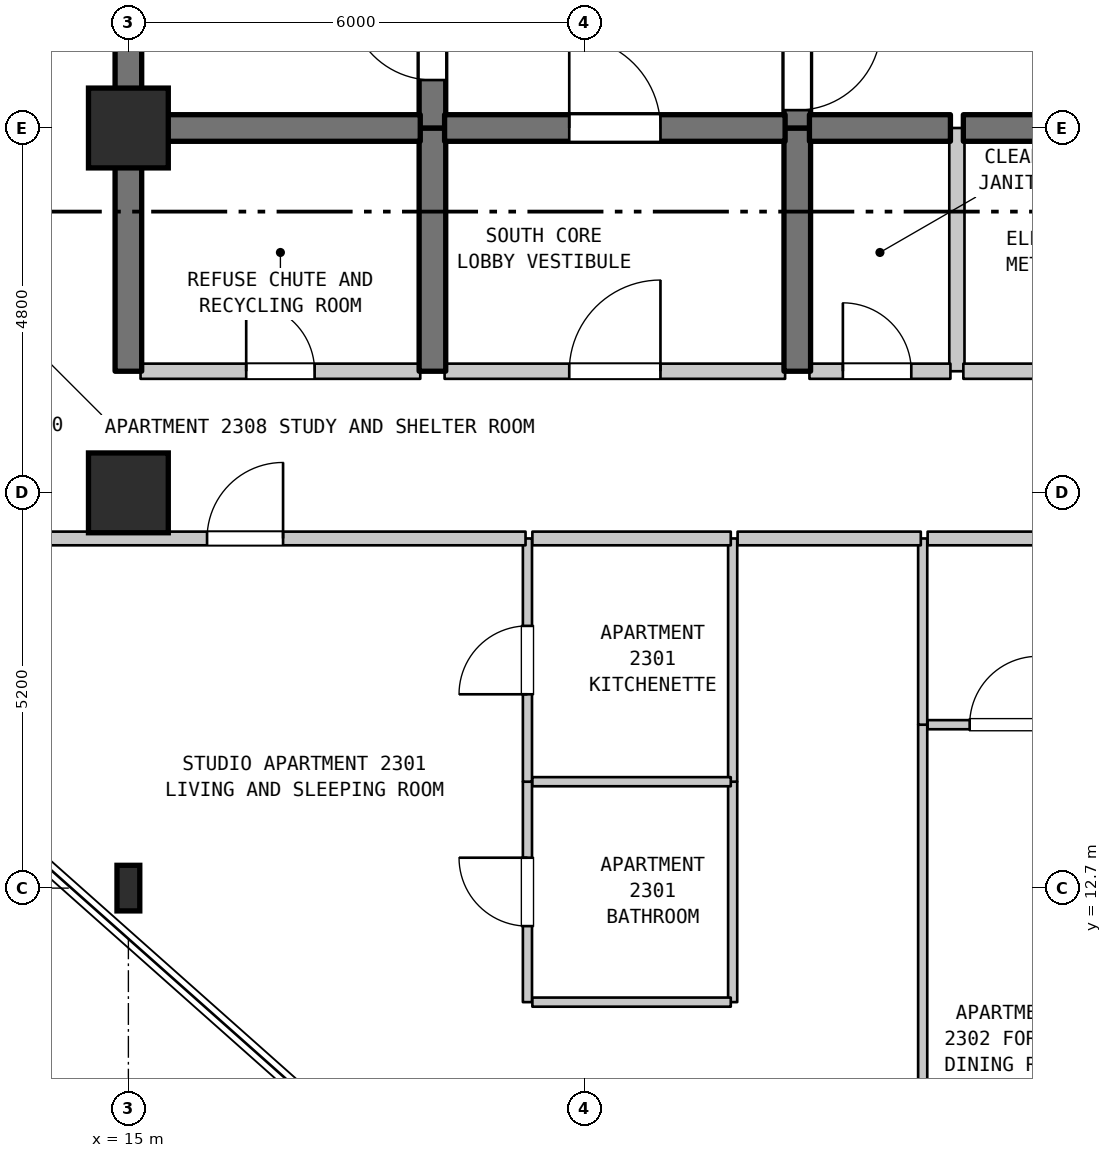
"""IFC4 building model, lengths in metres.
Left out: names, types, materials, properties, quantities, classifications, styles, units other than length and angle.
Written with IfcOpenShell. Run it as: python <this file> out.ifc"""

import sys

from ifc_helpers import new_model, si_unit, direction, frame, frame_2d, origin, origin_2d, place, context, subcontext, project, spatial, rectangle, i_section, extrude, element, fill, save


model = new_model("IFC4")
c1 = context("Model", 3, precision=1e-05, world=origin(), true_north=direction((0.0, 1.0)))
c2 = subcontext(c1, "Body", "Model", "MODEL_VIEW")
j1 = project(units=[si_unit("LENGTHUNIT", "METRE"), si_unit("PLANEANGLEUNIT", "RADIAN")], contexts=[c1])
p1 = place(None, origin())
s1 = spatial("IfcSite", under=j1, at=p1, CompositionType="ELEMENT")
p2 = place(p1, origin())
s2 = spatial("IfcBuilding", under=s1, at=p2, CompositionType="ELEMENT")
p3 = place(p2, frame((0.0, 0.0, 98.3)))
s3 = spatial("IfcBuildingStorey", under=s2, at=p3, CompositionType="ELEMENT", Elevation=98.3)
p4 = place(p3, frame((15.0, 12.7, 0.0), z_axis=(0.0, 0.0, 1.0), x_axis=(1.0, 0.0, 0.0)))
e1 = element("IfcColumn", 1, at=p4, inside=s3, PredefinedType="COLUMN", context=c2, shape_type="SweptSolid", body=[
    extrude(i_section(OverallWidth=0.3, OverallDepth=0.6, WebThickness=0.015, FlangeThickness=0.03, FilletRadius=0.027, at=origin_2d()), origin(), (0.0, 0.0, 1.0), 3.7),
])
for number, where, z_axis, x_axis in (
    (2, (15.0, 17.9, 0.0), (0.0, 0.0, 1.0), (1.0, 0.0, 0.0)),
    (3, (15.0, 22.7, 0.0), (0.0, 0.0, 1.0), (1.0, 0.0, 0.0)),
):
    element("IfcColumn", number, at=place(p3, frame(where, z_axis=z_axis, x_axis=x_axis)), inside=s3, PredefinedType="COLUMN", context=c2, shape_type="SweptSolid", body=[
        extrude(rectangle(XDim=1.05, YDim=1.05, at=origin_2d()), origin(), (0.0, 0.0, 1.0), 3.7),
    ])
p5 = place(p3, frame((15.0, 19.5, 0.0), z_axis=(0.0, 0.0, 1.0), x_axis=(0.0, 1.0, 0.0)))
e4 = element("IfcWall", 4, at=p5, inside=s3, PredefinedType="SHEAR", context=c2, shape_type="SweptSolid", body=[
    extrude(rectangle(XDim=3.2, YDim=0.35, at=frame_2d((1.6, 0.0))), origin(), (0.0, 0.0, 1.0), 3.385),
])
p6 = place(p3, frame((15.0, 22.7, 0.0), z_axis=(0.0, 0.0, 1.0), x_axis=(0.0, 1.0, 0.0)))
e5 = element("IfcWall", 5, at=p6, inside=s3, PredefinedType="SHEAR", context=c2, shape_type="SweptSolid", body=[
    extrude(rectangle(XDim=6.8, YDim=0.35, at=frame_2d((3.4, 0.0))), origin(), (0.0, 0.0, 1.0), 3.385),
])
p7 = place(p3, frame((19.0, 19.5, 0.0), z_axis=(0.0, 0.0, 1.0), x_axis=(0.0, 1.0, 0.0)))
e6 = element("IfcWall", 6, at=p7, inside=s3, PredefinedType="SHEAR", context=c2, shape_type="SweptSolid", body=[
    extrude(rectangle(XDim=3.2, YDim=0.35, at=frame_2d((1.6, 0.0))), origin(), (0.0, 0.0, 1.0), 3.385),
])
p8 = place(p3, frame((19.0, 22.7, 0.0), z_axis=(0.0, 0.0, 1.0), x_axis=(0.0, 1.0, 0.0)))
e7 = element("IfcWall", 7, at=p8, inside=s3, PredefinedType="SHEAR", context=c2, shape_type="SweptSolid", body=[
    extrude(rectangle(XDim=5.5, YDim=0.35, at=frame_2d((2.75, 0.0))), origin(), (0.0, 0.0, 1.0), 3.385),
])
p9 = place(p8, frame((0.631, 0.0, 0.0)))
e8 = element("IfcOpeningElement", 8, at=p9, cuts=e7, PredefinedType="OPENING", context=c2, shape_type="SweptSolid", body=[
    extrude(rectangle(XDim=1.1, YDim=2.15, at=frame_2d((0.55, 1.075))), frame((0.0, 0.185, 0.0), z_axis=(0.0, -1.0, 0.0), x_axis=(1.0, 0.0, 0.0)), (0.0, 0.0, 1.0), 0.37),
])
p10 = place(p3, frame((20.25, 11.2, 0.0), z_axis=(0.0, 0.0, 1.0), x_axis=(0.0, 1.0, 0.0)))
e9 = element("IfcWall", 9, at=p10, inside=s3, PredefinedType="PARTITIONING", context=c2, shape_type="SweptSolid", body=[
    extrude(rectangle(XDim=2.9, YDim=0.12, at=frame_2d((1.45, 0.0))), origin(), (0.0, 0.0, 1.0), 3.385),
])
p11 = place(p10, frame((1.0, 0.0, 0.0)))
e10 = element("IfcOpeningElement", 10, at=p11, cuts=e9, PredefinedType="OPENING", context=c2, shape_type="SweptSolid", body=[
    extrude(rectangle(XDim=0.9, YDim=2.1, at=frame_2d((0.45, 1.05))), frame((0.0, 0.07, 0.0), z_axis=(0.0, -1.0, 0.0), x_axis=(1.0, 0.0, 0.0)), (0.0, 0.0, 1.0), 0.14),
])
p12 = place(p3, frame((20.25, 14.1, 0.0), z_axis=(0.0, 0.0, 1.0), x_axis=(0.0, 1.0, 0.0)))
e11 = element("IfcWall", 11, at=p12, inside=s3, PredefinedType="PARTITIONING", context=c2, shape_type="SweptSolid", body=[
    extrude(rectangle(XDim=3.2, YDim=0.12, at=frame_2d((1.6, 0.0))), origin(), (0.0, 0.0, 1.0), 3.385),
])
p13 = place(p12, frame((1.15, 0.0, 0.0)))
e12 = element("IfcOpeningElement", 12, at=p13, cuts=e11, PredefinedType="OPENING", context=c2, shape_type="SweptSolid", body=[
    extrude(rectangle(XDim=0.9, YDim=2.15, at=frame_2d((0.45, 1.075))), frame((0.0, 0.07, 0.0), z_axis=(0.0, -1.0, 0.0), x_axis=(1.0, 0.0, 0.0)), (0.0, 0.0, 1.0), 0.14),
])
p14 = place(p3, frame((22.95, 11.2, 0.0), z_axis=(0.0, 0.0, 1.0), x_axis=(0.0, 1.0, 0.0)))
e13 = element("IfcWall", 13, at=p14, inside=s3, PredefinedType="PARTITIONING", context=c2, shape_type="SweptSolid", body=[
    extrude(rectangle(XDim=2.9, YDim=0.12, at=frame_2d((1.45, 0.0))), origin(), (0.0, 0.0, 1.0), 3.385),
])
p15 = place(p3, frame((22.95, 14.1, 0.0), z_axis=(0.0, 0.0, 1.0), x_axis=(0.0, 1.0, 0.0)))
e14 = element("IfcWall", 14, at=p15, inside=s3, PredefinedType="PARTITIONING", context=c2, shape_type="SweptSolid", body=[
    extrude(rectangle(XDim=3.2, YDim=0.12, at=frame_2d((1.6, 0.0))), origin(), (0.0, 0.0, 1.0), 3.385),
])
p16 = place(p3, frame((23.8, 19.5, 0.0), z_axis=(0.0, 0.0, 1.0), x_axis=(0.0, 1.0, 0.0)))
e15 = element("IfcWall", 15, at=p16, inside=s3, PredefinedType="SHEAR", context=c2, shape_type="SweptSolid", body=[
    extrude(rectangle(XDim=3.2, YDim=0.35, at=frame_2d((1.6, 0.0))), origin(), (0.0, 0.0, 1.0), 3.385),
])
p17 = place(p3, frame((23.8, 22.7, 0.0), z_axis=(0.0, 0.0, 1.0), x_axis=(0.0, 1.0, 0.0)))
e16 = element("IfcWall", 16, at=p17, inside=s3, PredefinedType="SHEAR", context=c2, shape_type="SweptSolid", body=[
    extrude(rectangle(XDim=5.5, YDim=0.35, at=frame_2d((2.75, 0.0))), origin(), (0.0, 0.0, 1.0), 3.385),
])
p18 = place(p17, frame((0.235, 0.0, 0.0)))
e17 = element("IfcOpeningElement", 17, at=p18, cuts=e16, PredefinedType="OPENING", context=c2, shape_type="SweptSolid", body=[
    extrude(rectangle(XDim=1.1, YDim=2.15, at=frame_2d((0.55, 1.075))), frame((0.0, 0.185, 0.0), z_axis=(0.0, -1.0, 0.0), x_axis=(1.0, 0.0, 0.0)), (0.0, 0.0, 1.0), 0.37),
])
p19 = place(p3, frame((25.45, 0.71, 0.0), z_axis=(0.0, 0.0, 1.0), x_axis=(0.0, 1.0, 0.0)))
e18 = element("IfcWall", 18, at=p19, inside=s3, PredefinedType="PARTITIONING", context=c2, shape_type="SweptSolid", body=[
    extrude(rectangle(XDim=14.14, YDim=0.12, at=frame_2d((7.07, 0.0))), origin(), (0.0, 0.0, 1.0), 3.385),
])
p20 = place(p3, frame((25.45, 14.85, 0.0), z_axis=(0.0, 0.0, 1.0), x_axis=(0.0, 1.0, 0.0)))
e19 = element("IfcWall", 19, at=p20, inside=s3, PredefinedType="PARTITIONING", context=c2, shape_type="SweptSolid", body=[
    extrude(rectangle(XDim=2.45, YDim=0.12, at=frame_2d((1.225, 0.0))), origin(), (0.0, 0.0, 1.0), 3.385),
])
p21 = place(p3, frame((25.9, 19.5, 0.0), z_axis=(0.0, 0.0, 1.0), x_axis=(0.0, 1.0, 0.0)))
e20 = element("IfcWall", 20, at=p21, inside=s3, PredefinedType="STANDARD", context=c2, shape_type="SweptSolid", body=[
    extrude(rectangle(XDim=3.2, YDim=0.2, at=frame_2d((1.6, 0.0))), origin(), (0.0, 0.0, 1.0), 3.385),
])
for number, where, z_axis, x_axis in (
    (21, (20.315, 11.2, 0.0), (0.0, 0.0, 1.0), (1.0, 0.0, 0.0)),
    (22, (20.315, 14.1, 0.0), (0.0, 0.0, 1.0), (1.0, 0.0, 0.0)),
):
    element("IfcWall", number, at=place(p3, frame(where, z_axis=z_axis, x_axis=x_axis)), inside=s3, PredefinedType="PARTITIONING", context=c2, shape_type="SweptSolid", body=[
        extrude(rectangle(XDim=2.61, YDim=0.12, at=frame_2d((1.305, 0.0))), origin(), (0.0, 0.0, 1.0), 3.385),
    ])
p22 = place(p3, frame((25.515, 14.85, 0.0), z_axis=(0.0, 0.0, 1.0), x_axis=(1.0, 0.0, 0.0)))
e23 = element("IfcWall", 23, at=p22, inside=s3, PredefinedType="PARTITIONING", context=c2, shape_type="SweptSolid", body=[
    extrude(rectangle(XDim=2.16, YDim=0.12, at=frame_2d((1.08, 0.0))), origin(), (0.0, 0.0, 1.0), 3.385),
])
p23 = place(p22, frame((0.553, 0.0, 0.0)))
e24 = element("IfcOpeningElement", 24, at=p23, cuts=e23, PredefinedType="OPENING", context=c2, shape_type="SweptSolid", body=[
    extrude(rectangle(XDim=0.9, YDim=2.15, at=frame_2d((0.45, 1.075))), frame((0.0, 0.07, 0.0), z_axis=(0.0, -1.0, 0.0), x_axis=(1.0, 0.0, 0.0)), (0.0, 0.0, 1.0), 0.14),
])
p24 = place(p3, frame((12.875, 17.3, 0.0), z_axis=(0.0, 0.0, 1.0), x_axis=(1.0, 0.0, 0.0)))
e25 = element("IfcWall", 25, at=p24, inside=s3, PredefinedType="STANDARD", context=c2, shape_type="SweptSolid", body=[
    extrude(rectangle(XDim=7.35, YDim=0.18, at=frame_2d((3.675, 0.0))), origin(), (0.0, 0.0, 1.0), 3.385),
])
p25 = place(p24, frame((3.16, 0.0, 0.0)))
e26 = element("IfcOpeningElement", 26, at=p25, cuts=e25, PredefinedType="OPENING", context=c2, shape_type="SweptSolid", body=[
    extrude(rectangle(XDim=1.0, YDim=2.15, at=frame_2d((0.5, 1.075))), frame((0.0, 0.1, 0.0), z_axis=(0.0, -1.0, 0.0), x_axis=(1.0, 0.0, 0.0)), (0.0, 0.0, 1.0), 0.2),
])
p26 = place(p3, frame((20.315, 17.3, 0.0), z_axis=(0.0, 0.0, 1.0), x_axis=(1.0, 0.0, 0.0)))
e27 = element("IfcWall", 27, at=p26, inside=s3, PredefinedType="STANDARD", context=c2, shape_type="SweptSolid", body=[
    extrude(rectangle(XDim=2.61, YDim=0.18, at=frame_2d((1.305, 0.0))), origin(), (0.0, 0.0, 1.0), 3.385),
])
p27 = place(p3, frame((23.015, 17.3, 0.0), z_axis=(0.0, 0.0, 1.0), x_axis=(1.0, 0.0, 0.0)))
e28 = element("IfcWall", 28, at=p27, inside=s3, PredefinedType="STANDARD", context=c2, shape_type="SweptSolid", body=[
    extrude(rectangle(XDim=2.41, YDim=0.18, at=frame_2d((1.205, 0.0))), origin(), (0.0, 0.0, 1.0), 3.385),
])
p28 = place(p3, frame((25.515, 17.3, 0.0), z_axis=(0.0, 0.0, 1.0), x_axis=(1.0, 0.0, 0.0)))
e29 = element("IfcWall", 29, at=p28, inside=s3, PredefinedType="STANDARD", context=c2, shape_type="SweptSolid", body=[
    extrude(rectangle(XDim=5.095, YDim=0.18, at=frame_2d((2.548, 0.0))), origin(), (0.0, 0.0, 1.0), 3.385),
])
p29 = place(p28, frame((2.08, 0.0, 0.0)))
e30 = element("IfcOpeningElement", 30, at=p29, cuts=e29, PredefinedType="OPENING", context=c2, shape_type="SweptSolid", body=[
    extrude(rectangle(XDim=1.0, YDim=2.15, at=frame_2d((0.5, 1.075))), frame((0.0, 0.1, 0.0), z_axis=(0.0, -1.0, 0.0), x_axis=(1.0, 0.0, 0.0)), (0.0, 0.0, 1.0), 0.2),
])
p30 = place(p3, frame((15.16, 19.5, 0.0), z_axis=(0.0, 0.0, 1.0), x_axis=(1.0, 0.0, 0.0)))
e31 = element("IfcWall", 31, at=p30, inside=s3, PredefinedType="STANDARD", context=c2, shape_type="SweptSolid", body=[
    extrude(rectangle(XDim=3.68, YDim=0.2, at=frame_2d((1.84, 0.0))), origin(), (0.0, 0.0, 1.0), 3.385),
])
p31 = place(p30, frame((1.39, 0.0, 0.0)))
e32 = element("IfcOpeningElement", 32, at=p31, cuts=e31, PredefinedType="OPENING", context=c2, shape_type="SweptSolid", body=[
    extrude(rectangle(XDim=0.9, YDim=2.15, at=frame_2d((0.45, 1.075))), frame((0.0, 0.11, 0.0), z_axis=(0.0, -1.0, 0.0), x_axis=(1.0, 0.0, 0.0)), (0.0, 0.0, 1.0), 0.22),
])
p32 = place(p3, frame((19.16, 19.5, 0.0), z_axis=(0.0, 0.0, 1.0), x_axis=(1.0, 0.0, 0.0)))
e33 = element("IfcWall", 33, at=p32, inside=s3, PredefinedType="STANDARD", context=c2, shape_type="SweptSolid", body=[
    extrude(rectangle(XDim=4.48, YDim=0.2, at=frame_2d((2.24, 0.0))), origin(), (0.0, 0.0, 1.0), 3.385),
])
p33 = place(p32, frame((1.64, 0.0, 0.0)))
e34 = element("IfcOpeningElement", 34, at=p33, cuts=e33, PredefinedType="OPENING", context=c2, shape_type="SweptSolid", body=[
    extrude(rectangle(XDim=1.2, YDim=2.2, at=frame_2d((0.6, 1.1))), frame((0.0, 0.11, 0.0), z_axis=(0.0, -1.0, 0.0), x_axis=(1.0, 0.0, 0.0)), (0.0, 0.0, 1.0), 0.22),
])
p34 = place(p3, frame((23.96, 19.5, 0.0), z_axis=(0.0, 0.0, 1.0), x_axis=(1.0, 0.0, 0.0)))
e35 = element("IfcWall", 35, at=p34, inside=s3, PredefinedType="STANDARD", context=c2, shape_type="SweptSolid", body=[
    extrude(rectangle(XDim=1.855, YDim=0.2, at=frame_2d((0.927, 0.0))), origin(), (0.0, 0.0, 1.0), 3.385),
])
p35 = place(p34, frame((0.44, 0.0, 0.0)))
e36 = element("IfcOpeningElement", 36, at=p35, cuts=e35, PredefinedType="OPENING", context=c2, shape_type="SweptSolid", body=[
    extrude(rectangle(XDim=0.9, YDim=2.15, at=frame_2d((0.45, 1.075))), frame((0.0, 0.11, 0.0), z_axis=(0.0, -1.0, 0.0), x_axis=(1.0, 0.0, 0.0)), (0.0, 0.0, 1.0), 0.22),
])
p36 = place(p3, frame((25.985, 19.5, 0.0), z_axis=(0.0, 0.0, 1.0), x_axis=(1.0, 0.0, 0.0)))
e37 = element("IfcWall", 37, at=p36, inside=s3, PredefinedType="STANDARD", context=c2, shape_type="SweptSolid", body=[
    extrude(rectangle(XDim=4.655, YDim=0.2, at=frame_2d((2.327, 0.0))), origin(), (0.0, 0.0, 1.0), 3.385),
])
p37 = place(p36, frame((1.845, 0.0, 0.0)))
e38 = element("IfcOpeningElement", 38, at=p37, cuts=e37, PredefinedType="OPENING", context=c2, shape_type="SweptSolid", body=[
    extrude(rectangle(XDim=0.9, YDim=2.15, at=frame_2d((0.45, 1.075))), frame((0.0, 0.11, 0.0), z_axis=(0.0, -1.0, 0.0), x_axis=(1.0, 0.0, 0.0)), (0.0, 0.0, 1.0), 0.22),
])
p38 = place(p3, frame((15.16, 22.7, 0.0), z_axis=(0.0, 0.0, 1.0), x_axis=(1.0, 0.0, 0.0)))
e39 = element("IfcWall", 39, at=p38, inside=s3, PredefinedType="SHEAR", context=c2, shape_type="SweptSolid", body=[
    extrude(rectangle(XDim=3.68, YDim=0.35, at=frame_2d((1.84, 0.0))), origin(), (0.0, 0.0, 1.0), 3.385),
])
p39 = place(p3, frame((19.16, 22.7, 0.0), z_axis=(0.0, 0.0, 1.0), x_axis=(1.0, 0.0, 0.0)))
e40 = element("IfcWall", 40, at=p39, inside=s3, PredefinedType="SHEAR", context=c2, shape_type="SweptSolid", body=[
    extrude(rectangle(XDim=4.48, YDim=0.35, at=frame_2d((2.24, 0.0))), origin(), (0.0, 0.0, 1.0), 3.385),
])
p40 = place(p39, frame((1.64, 0.0, 0.0)))
e41 = element("IfcOpeningElement", 41, at=p40, cuts=e40, PredefinedType="OPENING", context=c2, shape_type="SweptSolid", body=[
    extrude(rectangle(XDim=1.2, YDim=2.2, at=frame_2d((0.6, 1.1))), frame((0.0, 0.185, 0.0), z_axis=(0.0, -1.0, 0.0), x_axis=(1.0, 0.0, 0.0)), (0.0, 0.0, 1.0), 0.37),
])
p41 = place(p3, frame((23.96, 22.7, 0.0), z_axis=(0.0, 0.0, 1.0), x_axis=(1.0, 0.0, 0.0)))
e42 = element("IfcWall", 42, at=p41, inside=s3, PredefinedType="SHEAR", context=c2, shape_type="SweptSolid", body=[
    extrude(rectangle(XDim=1.855, YDim=0.35, at=frame_2d((0.927, 0.0))), origin(), (0.0, 0.0, 1.0), 3.385),
])
p42 = place(p3, frame((25.985, 22.7, 0.0), z_axis=(0.0, 0.0, 1.0), x_axis=(1.0, 0.0, 0.0)))
e43 = element("IfcWall", 43, at=p42, inside=s3, PredefinedType="SHEAR", context=c2, shape_type="SweptSolid", body=[
    extrude(rectangle(XDim=1.155, YDim=0.35, at=frame_2d((0.577, 0.0))), origin(), (0.0, 0.0, 1.0), 3.385),
])
p43 = place(p9, origin())
e44 = element("IfcDoor", 44, at=p43, inside=s3, OperationType="SINGLE_SWING_RIGHT", PredefinedType="DOOR", context=c2, shape_type="SweptSolid", body=[
    extrude(rectangle(XDim=1.1, YDim=2.15, at=frame_2d((0.55, 1.075))), frame((0.0, 0.025, 0.0), z_axis=(0.0, -1.0, 0.0), x_axis=(1.0, 0.0, 0.0)), (0.0, 0.0, 1.0), 0.05),
])
fill(e8, e44)
p44 = place(p11, origin())
e45 = element("IfcDoor", 45, at=p44, inside=s3, OperationType="SINGLE_SWING_RIGHT", PredefinedType="DOOR", context=c2, shape_type="SweptSolid", body=[
    extrude(rectangle(XDim=0.9, YDim=2.1, at=frame_2d((0.45, 1.05))), frame((0.0, 0.025, 0.0), z_axis=(0.0, -1.0, 0.0), x_axis=(1.0, 0.0, 0.0)), (0.0, 0.0, 1.0), 0.05),
])
fill(e10, e45)
p45 = place(p13, origin())
e46 = element("IfcDoor", 46, at=p45, inside=s3, OperationType="SINGLE_SWING_LEFT", PredefinedType="DOOR", context=c2, shape_type="SweptSolid", body=[
    extrude(rectangle(XDim=0.9, YDim=2.15, at=frame_2d((0.45, 1.075))), frame((0.0, 0.025, 0.0), z_axis=(0.0, -1.0, 0.0), x_axis=(1.0, 0.0, 0.0)), (0.0, 0.0, 1.0), 0.05),
])
fill(e12, e46)
p46 = place(p18, frame((1.1, 0.0, 0.0), z_axis=(0.0, 0.0, 1.0), x_axis=(-1.0, 0.0, 0.0)))
e47 = element("IfcDoor", 47, at=p46, inside=s3, OperationType="SINGLE_SWING_RIGHT", PredefinedType="DOOR", context=c2, shape_type="SweptSolid", body=[
    extrude(rectangle(XDim=1.1, YDim=2.15, at=frame_2d((0.55, 1.075))), frame((0.0, 0.025, 0.0), z_axis=(0.0, -1.0, 0.0), x_axis=(1.0, 0.0, 0.0)), (0.0, 0.0, 1.0), 0.05),
])
fill(e17, e47)
p47 = place(p23, origin())
e48 = element("IfcDoor", 48, at=p47, inside=s3, OperationType="SINGLE_SWING_RIGHT", PredefinedType="DOOR", context=c2, shape_type="SweptSolid", body=[
    extrude(rectangle(XDim=0.9, YDim=2.15, at=frame_2d((0.45, 1.075))), frame((0.0, 0.025, 0.0), z_axis=(0.0, -1.0, 0.0), x_axis=(1.0, 0.0, 0.0)), (0.0, 0.0, 1.0), 0.05),
])
fill(e24, e48)
p48 = place(p25, origin())
e49 = element("IfcDoor", 49, at=p48, inside=s3, OperationType="SINGLE_SWING_RIGHT", PredefinedType="DOOR", context=c2, shape_type="SweptSolid", body=[
    extrude(rectangle(XDim=1.0, YDim=2.15, at=frame_2d((0.5, 1.075))), frame((0.0, 0.025, 0.0), z_axis=(0.0, -1.0, 0.0), x_axis=(1.0, 0.0, 0.0)), (0.0, 0.0, 1.0), 0.05),
])
fill(e26, e49)
p49 = place(p31, origin())
e50 = element("IfcDoor", 50, at=p49, inside=s3, OperationType="SINGLE_SWING_LEFT", PredefinedType="DOOR", context=c2, shape_type="SweptSolid", body=[
    extrude(rectangle(XDim=0.9, YDim=2.15, at=frame_2d((0.45, 1.075))), frame((0.0, 0.025, 0.0), z_axis=(0.0, -1.0, 0.0), x_axis=(1.0, 0.0, 0.0)), (0.0, 0.0, 1.0), 0.05),
])
fill(e32, e50)
p50 = place(p33, origin())
e51 = element("IfcDoor", 51, at=p50, inside=s3, OperationType="SINGLE_SWING_RIGHT", PredefinedType="DOOR", context=c2, shape_type="SweptSolid", body=[
    extrude(rectangle(XDim=1.2, YDim=2.2, at=frame_2d((0.6, 1.1))), frame((0.0, 0.025, 0.0), z_axis=(0.0, -1.0, 0.0), x_axis=(1.0, 0.0, 0.0)), (0.0, 0.0, 1.0), 0.05),
])
fill(e34, e51)
p51 = place(p35, origin())
e52 = element("IfcDoor", 52, at=p51, inside=s3, OperationType="SINGLE_SWING_LEFT", PredefinedType="DOOR", context=c2, shape_type="SweptSolid", body=[
    extrude(rectangle(XDim=0.9, YDim=2.15, at=frame_2d((0.45, 1.075))), frame((0.0, 0.025, 0.0), z_axis=(0.0, -1.0, 0.0), x_axis=(1.0, 0.0, 0.0)), (0.0, 0.0, 1.0), 0.05),
])
fill(e36, e52)
p52 = place(p40, origin())
e53 = element("IfcDoor", 53, at=p52, inside=s3, OperationType="SINGLE_SWING_LEFT", PredefinedType="DOOR", context=c2, shape_type="SweptSolid", body=[
    extrude(rectangle(XDim=1.2, YDim=2.2, at=frame_2d((0.6, 1.1))), frame((0.0, 0.025, 0.0), z_axis=(0.0, -1.0, 0.0), x_axis=(1.0, 0.0, 0.0)), (0.0, 0.0, 1.0), 0.05),
])
fill(e41, e53)
save(model, sys.argv[1])
